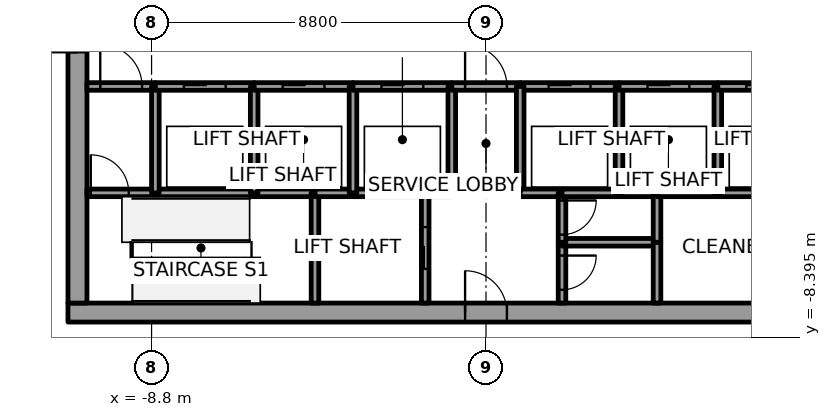
"""IFC4 building model, lengths in metres.
Left out: names, types, materials, properties, quantities, classifications, styles, units other than length and angle.
Written with IfcOpenShell. Run it as: python <this file> out.ifc"""

import sys

from ifc_helpers import new_model, si_unit, direction, frame, frame_2d, origin, place, context, subcontext, project, spatial, rectangle, extrude, element, fill, save


model = new_model("IFC4")
c1 = context("Model", 3, precision=1e-05, world=origin(), true_north=direction((0.0, 1.0)))
c2 = subcontext(c1, "Body", "Model", "MODEL_VIEW")
j1 = project(units=[si_unit("LENGTHUNIT", "METRE"), si_unit("PLANEANGLEUNIT", "RADIAN")], contexts=[c1])
p1 = place(None, origin())
s1 = spatial("IfcSite", under=j1, at=p1, CompositionType="ELEMENT")
p2 = place(p1, origin())
s2 = spatial("IfcBuilding", under=s1, at=p2, CompositionType="ELEMENT")
p3 = place(p2, frame((0.0, 0.0, 153.8)))
s3 = spatial("IfcBuildingStorey", under=s2, at=p3, CompositionType="ELEMENT", Elevation=153.8)
p4 = place(p3, frame((-11.0, -7.75, 0.0), z_axis=(0.0, 0.0, 1.0), x_axis=(1.0, 0.0, 0.0)))
e1 = element("IfcWall", 1, at=p4, inside=s3, PredefinedType="SHEAR", context=c2, shape_type="SweptSolid", body=[
    extrude(rectangle(XDim=22.0, YDim=0.5, at=frame_2d((11.0, 0.0))), origin(), (0.0, 0.0, 1.0), 4.0),
])
p5 = place(p4, frame((10.45, 0.0, 0.0)))
e2 = element("IfcOpeningElement", 2, at=p5, cuts=e1, PredefinedType="OPENING", context=c2, shape_type="SweptSolid", body=[
    extrude(rectangle(XDim=1.1, YDim=2.1, at=frame_2d((0.55, 1.05))), frame((0.0, 0.25, 0.0), z_axis=(0.0, -1.0, 0.0), x_axis=(1.0, 0.0, 0.0)), (0.0, 0.0, 1.0), 0.5),
])
p6 = place(p3, frame((-10.75, -7.5, 0.0), z_axis=(0.0, 0.0, 1.0), x_axis=(0.0, 1.0, 0.0)))
e3 = element("IfcWall", 3, at=p6, inside=s3, PredefinedType="SHEAR", context=c2, shape_type="SweptSolid", body=[
    extrude(rectangle(XDim=15.0, YDim=0.5, at=frame_2d((7.5, 0.0))), origin(), (0.0, 0.0, 1.0), 4.0),
])
p7 = place(p6, frame((6.6, 0.0, 0.0)))
e4 = element("IfcOpeningElement", 4, at=p7, cuts=e3, PredefinedType="OPENING", context=c2, shape_type="SweptSolid", body=[
    extrude(rectangle(XDim=1.8, YDim=2.1, at=frame_2d((0.9, 1.05))), frame((0.0, 0.25, 0.0), z_axis=(0.0, -1.0, 0.0), x_axis=(1.0, 0.0, 0.0)), (0.0, 0.0, 1.0), 0.5),
])
p8 = place(p3, frame((-10.5, -4.6, 0.0), z_axis=(0.0, 0.0, 1.0), x_axis=(1.0, 0.0, 0.0)))
e5 = element("IfcWall", 5, at=p8, inside=s3, PredefinedType="SOLIDWALL", context=c2, shape_type="SweptSolid", body=[
    extrude(rectangle(XDim=1.8, YDim=0.2, at=frame_2d((0.9, 0.0))), origin(), (0.0, 0.0, 1.0), 3.85),
])
p9 = place(p8, frame((0.1, 0.0, 0.0)))
e6 = element("IfcOpeningElement", 6, at=p9, cuts=e5, PredefinedType="OPENING", context=c2, shape_type="SweptSolid", body=[
    extrude(rectangle(XDim=1.0, YDim=2.1, at=frame_2d((0.5, 1.05))), frame((0.0, 0.1, 0.0), z_axis=(0.0, -1.0, 0.0), x_axis=(1.0, 0.0, 0.0)), (0.0, 0.0, 1.0), 0.2),
])
p10 = place(p3, frame((-10.5, -1.8, 0.0), z_axis=(0.0, 0.0, 1.0), x_axis=(1.0, 0.0, 0.0)))
e7 = element("IfcWall", 7, at=p10, inside=s3, PredefinedType="SOLIDWALL", context=c2, shape_type="SweptSolid", body=[
    extrude(rectangle(XDim=1.8, YDim=0.2, at=frame_2d((0.9, 0.0))), origin(), (0.0, 0.0, 1.0), 3.85),
])
p11 = place(p10, frame((0.35, 0.0, 0.0)))
e8 = element("IfcOpeningElement", 8, at=p11, cuts=e7, PredefinedType="OPENING", context=c2, shape_type="SweptSolid", body=[
    extrude(rectangle(XDim=1.1, YDim=2.1, at=frame_2d((0.55, 1.05))), frame((0.0, 0.1, 0.0), z_axis=(0.0, -1.0, 0.0), x_axis=(1.0, 0.0, 0.0)), (0.0, 0.0, 1.0), 0.2),
])
p12 = place(p3, frame((-8.7, -4.6, 0.0), z_axis=(0.0, 0.0, 1.0), x_axis=(1.0, 0.0, 0.0)))
e9 = element("IfcWall", 9, at=p12, inside=s3, PredefinedType="SOLIDWALL", context=c2, shape_type="SweptSolid", body=[
    extrude(rectangle(XDim=2.6, YDim=0.2, at=frame_2d((1.3, 0.0))), origin(), (0.0, 0.0, 1.0), 3.85),
])
p13 = place(p3, frame((-8.7, -4.6, 0.0), z_axis=(0.0, 0.0, 1.0), x_axis=(0.0, 1.0, 0.0)))
e10 = element("IfcWall", 10, at=p13, inside=s3, PredefinedType="SOLIDWALL", context=c2, shape_type="SweptSolid", body=[
    extrude(rectangle(XDim=2.8, YDim=0.2, at=frame_2d((1.4, 0.0))), origin(), (0.0, 0.0, 1.0), 3.85),
])
p14 = place(p3, frame((-8.7, -1.8, 0.0), z_axis=(0.0, 0.0, 1.0), x_axis=(1.0, 0.0, 0.0)))
e11 = element("IfcWall", 11, at=p14, inside=s3, PredefinedType="SOLIDWALL", context=c2, shape_type="SweptSolid", body=[
    extrude(rectangle(XDim=2.6, YDim=0.2, at=frame_2d((1.3, 0.0))), origin(), (0.0, 0.0, 1.0), 3.85),
])
p15 = place(p14, frame((0.75, 0.0, 0.0)))
e12 = element("IfcOpeningElement", 12, at=p15, cuts=e11, PredefinedType="OPENING", context=c2, shape_type="SweptSolid", body=[
    extrude(rectangle(XDim=1.1, YDim=2.1, at=frame_2d((0.55, 1.05))), frame((0.0, 0.1, 0.0), z_axis=(0.0, -1.0, 0.0), x_axis=(1.0, 0.0, 0.0)), (0.0, 0.0, 1.0), 0.2),
])
p16 = place(p3, frame((-6.1, -4.6, 0.0), z_axis=(0.0, 0.0, 1.0), x_axis=(1.0, 0.0, 0.0)))
e13 = element("IfcWall", 13, at=p16, inside=s3, PredefinedType="SOLIDWALL", context=c2, shape_type="SweptSolid", body=[
    extrude(rectangle(XDim=1.6, YDim=0.2, at=frame_2d((0.8, 0.0))), origin(), (0.0, 0.0, 1.0), 3.85),
])
p17 = place(p3, frame((-6.1, -4.6, 0.0), z_axis=(0.0, 0.0, 1.0), x_axis=(0.0, 1.0, 0.0)))
e14 = element("IfcWall", 14, at=p17, inside=s3, PredefinedType="SOLIDWALL", context=c2, shape_type="SweptSolid", body=[
    extrude(rectangle(XDim=2.8, YDim=0.2, at=frame_2d((1.4, 0.0))), origin(), (0.0, 0.0, 1.0), 3.85),
])
p18 = place(p3, frame((-6.1, -1.8, 0.0), z_axis=(0.0, 0.0, 1.0), x_axis=(1.0, 0.0, 0.0)))
e15 = element("IfcWall", 15, at=p18, inside=s3, PredefinedType="SOLIDWALL", context=c2, shape_type="SweptSolid", body=[
    extrude(rectangle(XDim=2.6, YDim=0.2, at=frame_2d((1.3, 0.0))), origin(), (0.0, 0.0, 1.0), 3.85),
])
p19 = place(p18, frame((0.75, 0.0, 0.0)))
e16 = element("IfcOpeningElement", 16, at=p19, cuts=e15, PredefinedType="OPENING", context=c2, shape_type="SweptSolid", body=[
    extrude(rectangle(XDim=1.1, YDim=2.1, at=frame_2d((0.55, 1.05))), frame((0.0, 0.1, 0.0), z_axis=(0.0, -1.0, 0.0), x_axis=(1.0, 0.0, 0.0)), (0.0, 0.0, 1.0), 0.2),
])
p20 = place(p3, frame((-4.5, -4.6, 0.0), z_axis=(0.0, 0.0, 1.0), x_axis=(0.0, -1.0, 0.0)))
e17 = element("IfcWall", 17, at=p20, inside=s3, PredefinedType="SOLIDWALL", context=c2, shape_type="SweptSolid", body=[
    extrude(rectangle(XDim=2.9, YDim=0.2, at=frame_2d((1.45, 0.0))), origin(), (0.0, 0.0, 1.0), 3.85),
])
p21 = place(p3, frame((-4.5, -4.6, 0.0), z_axis=(0.0, 0.0, 1.0), x_axis=(1.0, 0.0, 0.0)))
e18 = element("IfcWall", 18, at=p21, inside=s3, PredefinedType="SOLIDWALL", context=c2, shape_type="SweptSolid", body=[
    extrude(rectangle(XDim=1.0, YDim=0.2, at=frame_2d((0.5, 0.0))), origin(), (0.0, 0.0, 1.0), 3.85),
])
p22 = place(p3, frame((-3.5, -4.6, 0.0), z_axis=(0.0, 0.0, 1.0), x_axis=(1.0, 0.0, 0.0)))
e19 = element("IfcWall", 19, at=p22, inside=s3, PredefinedType="SOLIDWALL", context=c2, shape_type="SweptSolid", body=[
    extrude(rectangle(XDim=1.9, YDim=0.2, at=frame_2d((0.95, 0.0))), origin(), (0.0, 0.0, 1.0), 3.85),
])
p23 = place(p3, frame((-3.5, -4.6, 0.0), z_axis=(0.0, 0.0, 1.0), x_axis=(0.0, 1.0, 0.0)))
e20 = element("IfcWall", 20, at=p23, inside=s3, PredefinedType="SOLIDWALL", context=c2, shape_type="SweptSolid", body=[
    extrude(rectangle(XDim=2.8, YDim=0.2, at=frame_2d((1.4, 0.0))), origin(), (0.0, 0.0, 1.0), 3.85),
])
p24 = place(p3, frame((-3.5, -1.8, 0.0), z_axis=(0.0, 0.0, 1.0), x_axis=(1.0, 0.0, 0.0)))
e21 = element("IfcWall", 21, at=p24, inside=s3, PredefinedType="SOLIDWALL", context=c2, shape_type="SweptSolid", body=[
    extrude(rectangle(XDim=2.6, YDim=0.2, at=frame_2d((1.3, 0.0))), origin(), (0.0, 0.0, 1.0), 3.85),
])
p25 = place(p24, frame((0.75, 0.0, 0.0)))
e22 = element("IfcOpeningElement", 22, at=p25, cuts=e21, PredefinedType="OPENING", context=c2, shape_type="SweptSolid", body=[
    extrude(rectangle(XDim=1.1, YDim=2.1, at=frame_2d((0.55, 1.05))), frame((0.0, 0.1, 0.0), z_axis=(0.0, -1.0, 0.0), x_axis=(1.0, 0.0, 0.0)), (0.0, 0.0, 1.0), 0.2),
])
p26 = place(p3, frame((-1.6, -7.5, 0.0), z_axis=(0.0, 0.0, 1.0), x_axis=(0.0, 1.0, 0.0)))
e23 = element("IfcWall", 23, at=p26, inside=s3, PredefinedType="SOLIDWALL", context=c2, shape_type="SweptSolid", body=[
    extrude(rectangle(XDim=2.9, YDim=0.2, at=frame_2d((1.45, 0.0))), origin(), (0.0, 0.0, 1.0), 3.85),
])
p27 = place(p26, frame((0.9, 0.0, 0.0)))
e24 = element("IfcOpeningElement", 24, at=p27, cuts=e23, PredefinedType="OPENING", context=c2, shape_type="SweptSolid", body=[
    extrude(rectangle(XDim=1.1, YDim=2.1, at=frame_2d((0.55, 1.05))), frame((0.0, 0.1, 0.0), z_axis=(0.0, -1.0, 0.0), x_axis=(1.0, 0.0, 0.0)), (0.0, 0.0, 1.0), 0.2),
])
p28 = place(p3, frame((-1.6, -4.6, 0.0), z_axis=(0.0, 0.0, 1.0), x_axis=(1.0, 0.0, 0.0)))
e25 = element("IfcWall", 25, at=p28, inside=s3, PredefinedType="SOLIDWALL", context=c2, shape_type="SweptSolid", body=[
    extrude(rectangle(XDim=0.7, YDim=0.2, at=frame_2d((0.35, 0.0))), origin(), (0.0, 0.0, 1.0), 3.85),
])
p29 = place(p3, frame((-0.9, -4.6, 0.0), z_axis=(0.0, 0.0, 1.0), x_axis=(0.0, 1.0, 0.0)))
e26 = element("IfcWall", 26, at=p29, inside=s3, PredefinedType="SOLIDWALL", context=c2, shape_type="SweptSolid", body=[
    extrude(rectangle(XDim=2.8, YDim=0.2, at=frame_2d((1.4, 0.0))), origin(), (0.0, 0.0, 1.0), 3.85),
])
p30 = place(p3, frame((-0.9, -1.8, 0.0), z_axis=(0.0, 0.0, 1.0), x_axis=(1.0, 0.0, 0.0)))
e27 = element("IfcWall", 27, at=p30, inside=s3, PredefinedType="SOLIDWALL", context=c2, shape_type="SweptSolid", body=[
    extrude(rectangle(XDim=1.8, YDim=0.2, at=frame_2d((0.9, 0.0))), origin(), (0.0, 0.0, 1.0), 3.85),
])
p31 = place(p30, frame((0.35, 0.0, 0.0)))
e28 = element("IfcOpeningElement", 28, at=p31, cuts=e27, PredefinedType="OPENING", context=c2, shape_type="SweptSolid", body=[
    extrude(rectangle(XDim=1.1, YDim=2.1, at=frame_2d((0.55, 1.05))), frame((0.0, 0.1, 0.0), z_axis=(0.0, -1.0, 0.0), x_axis=(1.0, 0.0, 0.0)), (0.0, 0.0, 1.0), 0.2),
])
p32 = place(p3, frame((0.9, -1.8, 0.0), z_axis=(0.0, 0.0, 1.0), x_axis=(1.0, 0.0, 0.0)))
e29 = element("IfcWall", 29, at=p32, inside=s3, PredefinedType="SOLIDWALL", context=c2, shape_type="SweptSolid", body=[
    extrude(rectangle(XDim=2.6, YDim=0.2, at=frame_2d((1.3, 0.0))), origin(), (0.0, 0.0, 1.0), 3.85),
])
p33 = place(p32, frame((0.75, 0.0, 0.0)))
e30 = element("IfcOpeningElement", 30, at=p33, cuts=e29, PredefinedType="OPENING", context=c2, shape_type="SweptSolid", body=[
    extrude(rectangle(XDim=1.1, YDim=2.1, at=frame_2d((0.55, 1.05))), frame((0.0, 0.1, 0.0), z_axis=(0.0, -1.0, 0.0), x_axis=(1.0, 0.0, 0.0)), (0.0, 0.0, 1.0), 0.2),
])
p34 = place(p3, frame((0.9, -1.8, 0.0), z_axis=(0.0, 0.0, 1.0), x_axis=(0.0, -1.0, 0.0)))
e31 = element("IfcWall", 31, at=p34, inside=s3, PredefinedType="SOLIDWALL", context=c2, shape_type="SweptSolid", body=[
    extrude(rectangle(XDim=2.8, YDim=0.2, at=frame_2d((1.4, 0.0))), origin(), (0.0, 0.0, 1.0), 3.85),
])
p35 = place(p3, frame((0.9, -4.6, 0.0), z_axis=(0.0, 0.0, 1.0), x_axis=(1.0, 0.0, 0.0)))
e32 = element("IfcWall", 32, at=p35, inside=s3, PredefinedType="SOLIDWALL", context=c2, shape_type="SweptSolid", body=[
    extrude(rectangle(XDim=1.1, YDim=0.2, at=frame_2d((0.55, 0.0))), origin(), (0.0, 0.0, 1.0), 3.85),
])
p36 = place(p3, frame((2.0, -5.9, 0.0), z_axis=(0.0, 0.0, 1.0), x_axis=(0.0, -1.0, 0.0)))
e33 = element("IfcWall", 33, at=p36, inside=s3, PredefinedType="SOLIDWALL", context=c2, shape_type="SweptSolid", body=[
    extrude(rectangle(XDim=1.6, YDim=0.2, at=frame_2d((0.8, 0.0))), origin(), (0.0, 0.0, 1.0), 3.85),
])
p37 = place(p36, frame((0.35, 0.0, 0.0)))
e34 = element("IfcOpeningElement", 34, at=p37, cuts=e33, PredefinedType="OPENING", context=c2, shape_type="SweptSolid", body=[
    extrude(rectangle(XDim=0.9, YDim=2.1, at=frame_2d((0.45, 1.05))), frame((0.0, 0.1, 0.0), z_axis=(0.0, -1.0, 0.0), x_axis=(1.0, 0.0, 0.0)), (0.0, 0.0, 1.0), 0.2),
])
p38 = place(p3, frame((4.5, -5.9, 0.0), z_axis=(0.0, 0.0, 1.0), x_axis=(-1.0, 0.0, 0.0)))
e35 = element("IfcWall", 35, at=p38, inside=s3, PredefinedType="SOLIDWALL", context=c2, shape_type="SweptSolid", body=[
    extrude(rectangle(XDim=2.5, YDim=0.2, at=frame_2d((1.25, 0.0))), origin(), (0.0, 0.0, 1.0), 3.85),
])
p39 = place(p3, frame((2.0, -4.6, 0.0), z_axis=(0.0, 0.0, 1.0), x_axis=(0.0, -1.0, 0.0)))
e36 = element("IfcWall", 36, at=p39, inside=s3, PredefinedType="SOLIDWALL", context=c2, shape_type="SweptSolid", body=[
    extrude(rectangle(XDim=1.3, YDim=0.2, at=frame_2d((0.65, 0.0))), origin(), (0.0, 0.0, 1.0), 3.85),
])
p40 = place(p39, frame((0.2, 0.0, 0.0)))
e37 = element("IfcOpeningElement", 37, at=p40, cuts=e36, PredefinedType="OPENING", context=c2, shape_type="SweptSolid", body=[
    extrude(rectangle(XDim=0.9, YDim=2.1, at=frame_2d((0.45, 1.05))), frame((0.0, 0.1, 0.0), z_axis=(0.0, -1.0, 0.0), x_axis=(1.0, 0.0, 0.0)), (0.0, 0.0, 1.0), 0.2),
])
p41 = place(p3, frame((3.5, -4.6, 0.0), z_axis=(0.0, 0.0, 1.0), x_axis=(-1.0, 0.0, 0.0)))
e38 = element("IfcWall", 38, at=p41, inside=s3, PredefinedType="SOLIDWALL", context=c2, shape_type="SweptSolid", body=[
    extrude(rectangle(XDim=1.5, YDim=0.2, at=frame_2d((0.75, 0.0))), origin(), (0.0, 0.0, 1.0), 3.85),
])
p42 = place(p3, frame((4.5, -4.6, 0.0), z_axis=(0.0, 0.0, 1.0), x_axis=(-1.0, 0.0, 0.0)))
e39 = element("IfcWall", 39, at=p42, inside=s3, PredefinedType="SOLIDWALL", context=c2, shape_type="SweptSolid", body=[
    extrude(rectangle(XDim=1.0, YDim=0.2, at=frame_2d((0.5, 0.0))), origin(), (0.0, 0.0, 1.0), 3.85),
])
p43 = place(p3, frame((3.5, -4.6, 0.0), z_axis=(0.0, 0.0, 1.0), x_axis=(0.0, 1.0, 0.0)))
e40 = element("IfcWall", 40, at=p43, inside=s3, PredefinedType="SOLIDWALL", context=c2, shape_type="SweptSolid", body=[
    extrude(rectangle(XDim=2.8, YDim=0.2, at=frame_2d((1.4, 0.0))), origin(), (0.0, 0.0, 1.0), 3.85),
])
p44 = place(p3, frame((3.5, -1.8, 0.0), z_axis=(0.0, 0.0, 1.0), x_axis=(1.0, 0.0, 0.0)))
e41 = element("IfcWall", 41, at=p44, inside=s3, PredefinedType="SOLIDWALL", context=c2, shape_type="SweptSolid", body=[
    extrude(rectangle(XDim=2.6, YDim=0.2, at=frame_2d((1.3, 0.0))), origin(), (0.0, 0.0, 1.0), 3.85),
])
p45 = place(p44, frame((0.75, 0.0, 0.0)))
e42 = element("IfcOpeningElement", 42, at=p45, cuts=e41, PredefinedType="OPENING", context=c2, shape_type="SweptSolid", body=[
    extrude(rectangle(XDim=1.1, YDim=2.1, at=frame_2d((0.55, 1.05))), frame((0.0, 0.1, 0.0), z_axis=(0.0, -1.0, 0.0), x_axis=(1.0, 0.0, 0.0)), (0.0, 0.0, 1.0), 0.2),
])
p46 = place(p3, frame((4.5, -5.9, 0.0), z_axis=(0.0, 0.0, 1.0), x_axis=(0.0, -1.0, 0.0)))
e43 = element("IfcWall", 43, at=p46, inside=s3, PredefinedType="SOLIDWALL", context=c2, shape_type="SweptSolid", body=[
    extrude(rectangle(XDim=1.6, YDim=0.2, at=frame_2d((0.8, 0.0))), origin(), (0.0, 0.0, 1.0), 3.85),
])
p47 = place(p3, frame((4.5, -4.6, 0.0), z_axis=(0.0, 0.0, 1.0), x_axis=(0.0, -1.0, 0.0)))
e44 = element("IfcWall", 44, at=p47, inside=s3, PredefinedType="SOLIDWALL", context=c2, shape_type="SweptSolid", body=[
    extrude(rectangle(XDim=1.3, YDim=0.2, at=frame_2d((0.65, 0.0))), origin(), (0.0, 0.0, 1.0), 3.85),
])
p48 = place(p3, frame((6.1, -4.6, 0.0), z_axis=(0.0, 0.0, 1.0), x_axis=(-1.0, 0.0, 0.0)))
e45 = element("IfcWall", 45, at=p48, inside=s3, PredefinedType="SOLIDWALL", context=c2, shape_type="SweptSolid", body=[
    extrude(rectangle(XDim=1.6, YDim=0.2, at=frame_2d((0.8, 0.0))), origin(), (0.0, 0.0, 1.0), 3.85),
])
p49 = place(p3, frame((8.7, -4.6, 0.0), z_axis=(0.0, 0.0, 1.0), x_axis=(-1.0, 0.0, 0.0)))
e46 = element("IfcWall", 46, at=p49, inside=s3, PredefinedType="SOLIDWALL", context=c2, shape_type="SweptSolid", body=[
    extrude(rectangle(XDim=2.6, YDim=0.2, at=frame_2d((1.3, 0.0))), origin(), (0.0, 0.0, 1.0), 3.85),
])
p50 = place(p3, frame((6.1, -4.6, 0.0), z_axis=(0.0, 0.0, 1.0), x_axis=(0.0, 1.0, 0.0)))
e47 = element("IfcWall", 47, at=p50, inside=s3, PredefinedType="SOLIDWALL", context=c2, shape_type="SweptSolid", body=[
    extrude(rectangle(XDim=2.8, YDim=0.2, at=frame_2d((1.4, 0.0))), origin(), (0.0, 0.0, 1.0), 3.85),
])
p51 = place(p3, frame((6.1, -1.8, 0.0), z_axis=(0.0, 0.0, 1.0), x_axis=(1.0, 0.0, 0.0)))
e48 = element("IfcWall", 48, at=p51, inside=s3, PredefinedType="SOLIDWALL", context=c2, shape_type="SweptSolid", body=[
    extrude(rectangle(XDim=2.6, YDim=0.2, at=frame_2d((1.3, 0.0))), origin(), (0.0, 0.0, 1.0), 3.85),
])
p52 = place(p51, frame((0.75, 0.0, 0.0)))
e49 = element("IfcOpeningElement", 49, at=p52, cuts=e48, PredefinedType="OPENING", context=c2, shape_type="SweptSolid", body=[
    extrude(rectangle(XDim=1.1, YDim=2.1, at=frame_2d((0.55, 1.05))), frame((0.0, 0.1, 0.0), z_axis=(0.0, -1.0, 0.0), x_axis=(1.0, 0.0, 0.0)), (0.0, 0.0, 1.0), 0.2),
])
p53 = place(p15, origin())
e50 = element("IfcDoor", 50, at=p53, inside=s3, OperationType="SLIDING_TO_RIGHT", PredefinedType="DOOR", context=c2, shape_type="SweptSolid", body=[
    extrude(rectangle(XDim=1.1, YDim=2.1, at=frame_2d((0.55, 1.05))), frame((0.0, 0.025, 0.0), z_axis=(0.0, -1.0, 0.0), x_axis=(1.0, 0.0, 0.0)), (0.0, 0.0, 1.0), 0.05),
])
fill(e12, e50)
p54 = place(p19, origin())
e51 = element("IfcDoor", 51, at=p54, inside=s3, OperationType="SLIDING_TO_LEFT", PredefinedType="DOOR", context=c2, shape_type="SweptSolid", body=[
    extrude(rectangle(XDim=1.1, YDim=2.1, at=frame_2d((0.55, 1.05))), frame((0.0, 0.025, 0.0), z_axis=(0.0, -1.0, 0.0), x_axis=(1.0, 0.0, 0.0)), (0.0, 0.0, 1.0), 0.05),
])
fill(e16, e51)
p55 = place(p25, origin())
e52 = element("IfcDoor", 52, at=p55, inside=s3, OperationType="SLIDING_TO_RIGHT", PredefinedType="DOOR", context=c2, shape_type="SweptSolid", body=[
    extrude(rectangle(XDim=1.1, YDim=2.1, at=frame_2d((0.55, 1.05))), frame((0.0, 0.025, 0.0), z_axis=(0.0, -1.0, 0.0), x_axis=(1.0, 0.0, 0.0)), (0.0, 0.0, 1.0), 0.05),
])
fill(e22, e52)
p56 = place(p33, origin())
e53 = element("IfcDoor", 53, at=p56, inside=s3, OperationType="SLIDING_TO_RIGHT", PredefinedType="DOOR", context=c2, shape_type="SweptSolid", body=[
    extrude(rectangle(XDim=1.1, YDim=2.1, at=frame_2d((0.55, 1.05))), frame((0.0, 0.025, 0.0), z_axis=(0.0, -1.0, 0.0), x_axis=(1.0, 0.0, 0.0)), (0.0, 0.0, 1.0), 0.05),
])
fill(e30, e53)
p57 = place(p45, origin())
e54 = element("IfcDoor", 54, at=p57, inside=s3, OperationType="SLIDING_TO_LEFT", PredefinedType="DOOR", context=c2, shape_type="SweptSolid", body=[
    extrude(rectangle(XDim=1.1, YDim=2.1, at=frame_2d((0.55, 1.05))), frame((0.0, 0.025, 0.0), z_axis=(0.0, -1.0, 0.0), x_axis=(1.0, 0.0, 0.0)), (0.0, 0.0, 1.0), 0.05),
])
fill(e42, e54)
p58 = place(p52, origin())
e55 = element("IfcDoor", 55, at=p58, inside=s3, OperationType="SLIDING_TO_LEFT", PredefinedType="DOOR", context=c2, shape_type="SweptSolid", body=[
    extrude(rectangle(XDim=1.1, YDim=2.1, at=frame_2d((0.55, 1.05))), frame((0.0, 0.025, 0.0), z_axis=(0.0, -1.0, 0.0), x_axis=(1.0, 0.0, 0.0)), (0.0, 0.0, 1.0), 0.05),
])
fill(e49, e55)
p59 = place(p27, origin())
e56 = element("IfcDoor", 56, at=p59, inside=s3, OperationType="SLIDING_TO_RIGHT", PredefinedType="DOOR", context=c2, shape_type="SweptSolid", body=[
    extrude(rectangle(XDim=1.1, YDim=2.1, at=frame_2d((0.55, 1.05))), frame((0.0, 0.025, 0.0), z_axis=(0.0, -1.0, 0.0), x_axis=(1.0, 0.0, 0.0)), (0.0, 0.0, 1.0), 0.05),
])
fill(e24, e56)
p60 = place(p11, origin())
e57 = element("IfcDoor", 57, at=p60, inside=s3, OperationType="SINGLE_SWING_RIGHT", PredefinedType="DOOR", context=c2, shape_type="SweptSolid", body=[
    extrude(rectangle(XDim=1.1, YDim=2.1, at=frame_2d((0.55, 1.05))), frame((0.0, 0.025, 0.0), z_axis=(0.0, -1.0, 0.0), x_axis=(1.0, 0.0, 0.0)), (0.0, 0.0, 1.0), 0.05),
])
fill(e8, e57)
p61 = place(p31, origin())
e58 = element("IfcDoor", 58, at=p61, inside=s3, OperationType="SINGLE_SWING_RIGHT", PredefinedType="DOOR", context=c2, shape_type="SweptSolid", body=[
    extrude(rectangle(XDim=1.1, YDim=2.1, at=frame_2d((0.55, 1.05))), frame((0.0, 0.025, 0.0), z_axis=(0.0, -1.0, 0.0), x_axis=(1.0, 0.0, 0.0)), (0.0, 0.0, 1.0), 0.05),
])
fill(e28, e58)
p62 = place(p9, origin())
e59 = element("IfcDoor", 59, at=p62, inside=s3, OperationType="SINGLE_SWING_LEFT", PredefinedType="DOOR", context=c2, shape_type="SweptSolid", body=[
    extrude(rectangle(XDim=1.0, YDim=2.1, at=frame_2d((0.5, 1.05))), frame((0.0, 0.025, 0.0), z_axis=(0.0, -1.0, 0.0), x_axis=(1.0, 0.0, 0.0)), (0.0, 0.0, 1.0), 0.05),
])
fill(e6, e59)
p63 = place(p37, origin())
e60 = element("IfcDoor", 60, at=p63, inside=s3, OperationType="SINGLE_SWING_RIGHT", PredefinedType="DOOR", context=c2, shape_type="SweptSolid", body=[
    extrude(rectangle(XDim=0.9, YDim=2.1, at=frame_2d((0.45, 1.05))), frame((0.0, 0.025, 0.0), z_axis=(0.0, -1.0, 0.0), x_axis=(1.0, 0.0, 0.0)), (0.0, 0.0, 1.0), 0.05),
])
fill(e34, e60)
p64 = place(p40, origin())
e61 = element("IfcDoor", 61, at=p64, inside=s3, OperationType="SINGLE_SWING_LEFT", PredefinedType="DOOR", context=c2, shape_type="SweptSolid", body=[
    extrude(rectangle(XDim=0.9, YDim=2.1, at=frame_2d((0.45, 1.05))), frame((0.0, 0.025, 0.0), z_axis=(0.0, -1.0, 0.0), x_axis=(1.0, 0.0, 0.0)), (0.0, 0.0, 1.0), 0.05),
])
fill(e37, e61)
p65 = place(p7, origin())
e62 = element("IfcDoor", 62, at=p65, inside=s3, OperationType="DOUBLE_DOOR_SINGLE_SWING", PredefinedType="DOOR", context=c2, shape_type="SweptSolid", body=[
    extrude(rectangle(XDim=1.8, YDim=2.1, at=frame_2d((0.9, 1.05))), frame((0.0, 0.025, 0.0), z_axis=(0.0, -1.0, 0.0), x_axis=(1.0, 0.0, 0.0)), (0.0, 0.0, 1.0), 0.05),
])
fill(e4, e62)
p66 = place(p5, origin())
e63 = element("IfcDoor", 63, at=p66, inside=s3, OperationType="SINGLE_SWING_RIGHT", PredefinedType="DOOR", context=c2, shape_type="SweptSolid", body=[
    extrude(rectangle(XDim=1.1, YDim=2.1, at=frame_2d((0.55, 1.05))), frame((0.0, 0.025, 0.0), z_axis=(0.0, -1.0, 0.0), x_axis=(1.0, 0.0, 0.0)), (0.0, 0.0, 1.0), 0.05),
])
fill(e2, e63)
save(model, sys.argv[1])
